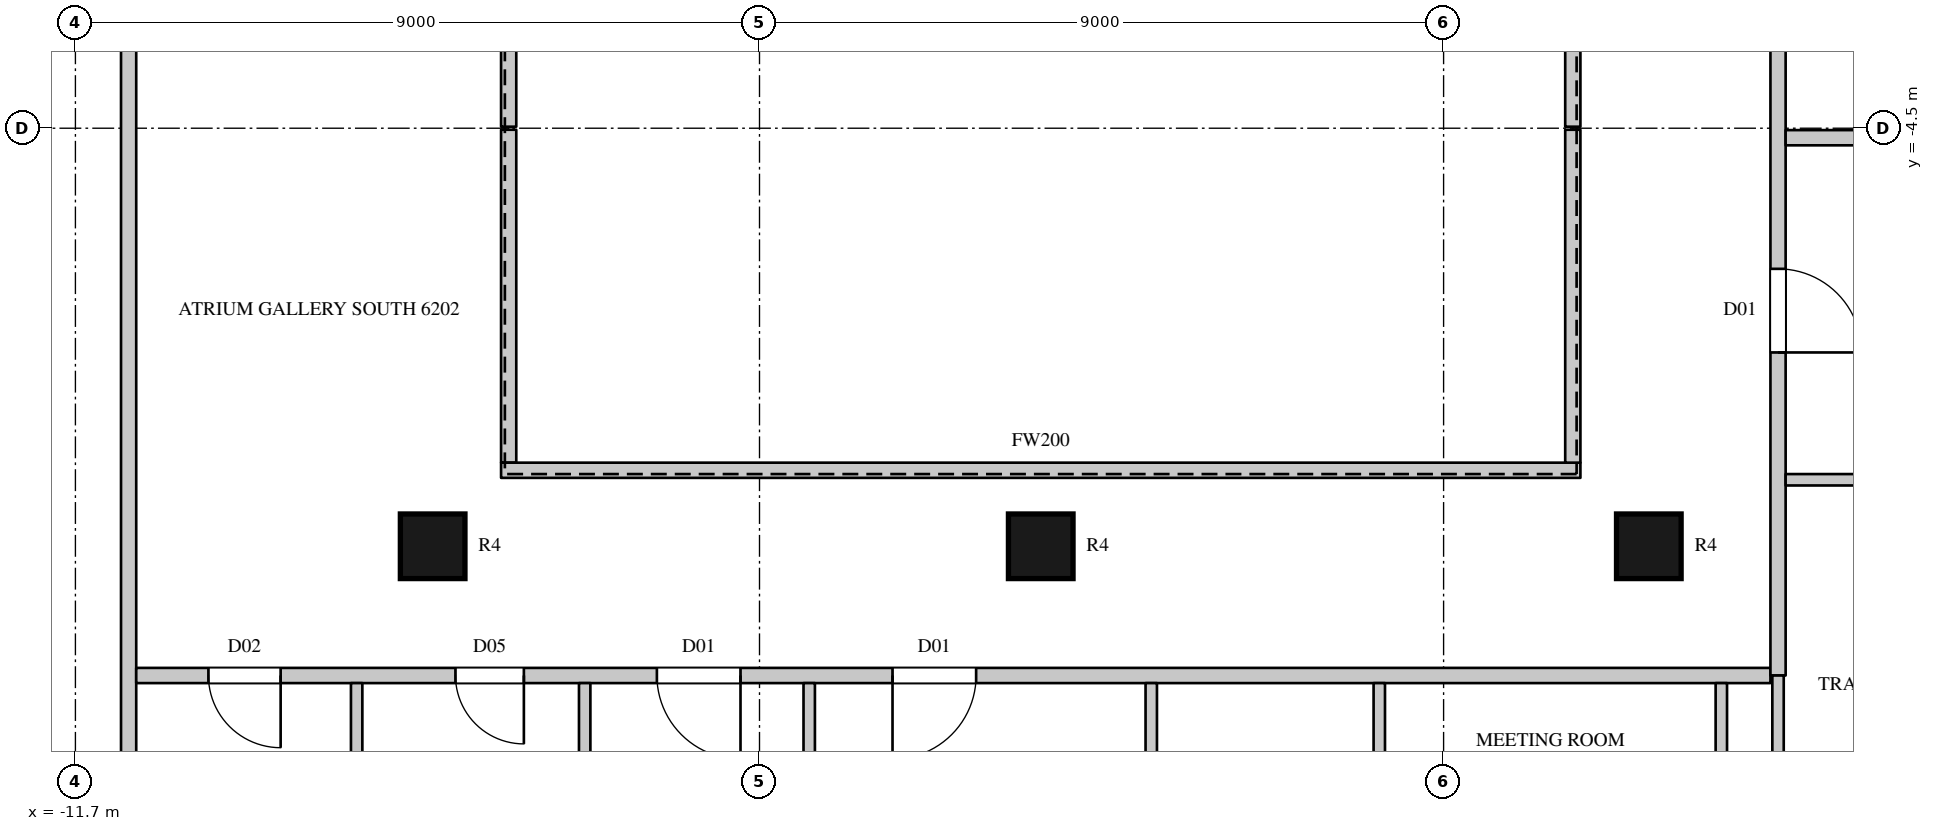
"""IFC4 building model, lengths in metres.
Left out: names, types, materials, properties, quantities, classifications, styles, units other than length and angle.
Written with IfcOpenShell. Run it as: python <this file> out.ifc"""

import sys

from ifc_helpers import new_model, si_unit, direction, frame, frame_2d, origin, origin_2d, place, context, subcontext, project, spatial, rectangle, circle, extrude, element, fill, save


model = new_model("IFC4")
c1 = context("Model", 3, precision=1e-05, world=origin(), true_north=direction((0.0, 1.0)))
c2 = subcontext(c1, "Body", "Model", "MODEL_VIEW")
j1 = project(units=[si_unit("LENGTHUNIT", "METRE"), si_unit("PLANEANGLEUNIT", "RADIAN")], contexts=[c1])
p1 = place(None, origin())
s1 = spatial("IfcSite", under=j1, at=p1, CompositionType="ELEMENT")
p2 = place(p1, origin())
s2 = spatial("IfcBuilding", under=s1, at=p2, CompositionType="ELEMENT")
p3 = place(p2, frame((0.0, 0.0, 276.2)))
s3 = spatial("IfcBuildingStorey", under=s2, at=p3, CompositionType="ELEMENT", Elevation=276.2)
for number, where, z_axis, x_axis in (
    (1, (-7.0, -10.0, 0.0), (0.0, 0.0, 1.0), (1.0, 0.0, 0.0)),
    (2, (1.0, -10.0, 0.0), (0.0, 0.0, 1.0), (1.0, 0.0, 0.0)),
    (3, (9.0, -10.0, 0.0), (0.0, 0.0, 1.0), (1.0, 0.0, 0.0)),
):
    element("IfcColumn", number, at=place(p3, frame(where, z_axis=z_axis, x_axis=x_axis)), inside=s3, PredefinedType="COLUMN", context=c2, shape_type="SweptSolid", body=[
        extrude(circle(Radius=0.425, at=origin_2d()), origin(), (0.0, 0.0, 1.0), 4.1),
    ])
p4 = place(p3, frame((-11.0, -14.8, 0.0), z_axis=(0.0, 0.0, 1.0), x_axis=(0.0, 1.0, 0.0)))
e4 = element("IfcWall", 4, at=p4, inside=s3, PredefinedType="PARTITIONING", context=c2, shape_type="SweptSolid", body=[
    extrude(rectangle(XDim=29.5, YDim=0.2, at=frame_2d((14.75, 0.0))), origin(), (0.0, 0.0, 1.0), 3.8),
])
p5 = place(p4, frame((17.9, 0.0, 0.0)))
e5 = element("IfcOpeningElement", 5, at=p5, cuts=e4, PredefinedType="OPENING", context=c2, shape_type="SweptSolid", body=[
    extrude(rectangle(XDim=1.5, YDim=2.4, at=frame_2d((0.75, 1.2))), frame((0.0, 0.11, 0.0), z_axis=(0.0, -1.0, 0.0), x_axis=(1.0, 0.0, 0.0)), (0.0, 0.0, 1.0), 0.22),
])
p6 = place(p3, frame((-10.9, -11.7, 0.0), z_axis=(0.0, 0.0, 1.0), x_axis=(1.0, 0.0, 0.0)))
e6 = element("IfcWall", 6, at=p6, inside=s3, PredefinedType="PARTITIONING", context=c2, shape_type="SweptSolid", body=[
    extrude(rectangle(XDim=21.5, YDim=0.2, at=frame_2d((10.75, 0.0))), origin(), (0.0, 0.0, 1.0), 3.8),
])
p7 = place(p6, frame((0.95, 0.0, 0.0)))
e7 = element("IfcOpeningElement", 7, at=p7, cuts=e6, PredefinedType="OPENING", context=c2, shape_type="SweptSolid", body=[
    extrude(rectangle(XDim=0.95, YDim=2.2, at=frame_2d((0.475, 1.1))), frame((0.0, 0.11, 0.0), z_axis=(0.0, -1.0, 0.0), x_axis=(1.0, 0.0, 0.0)), (0.0, 0.0, 1.0), 0.22),
])
p8 = place(p6, frame((4.2, 0.0, 0.0)))
e8 = element("IfcOpeningElement", 8, at=p8, cuts=e6, PredefinedType="OPENING", context=c2, shape_type="SweptSolid", body=[
    extrude(rectangle(XDim=0.9, YDim=2.2, at=frame_2d((0.45, 1.1))), frame((0.0, 0.11, 0.0), z_axis=(0.0, -1.0, 0.0), x_axis=(1.0, 0.0, 0.0)), (0.0, 0.0, 1.0), 0.22),
])
p9 = place(p6, frame((6.85, 0.0, 0.0)))
e9 = element("IfcOpeningElement", 9, at=p9, cuts=e6, PredefinedType="OPENING", context=c2, shape_type="SweptSolid", body=[
    extrude(rectangle(XDim=1.1, YDim=2.4, at=frame_2d((0.55, 1.2))), frame((0.0, 0.11, 0.0), z_axis=(0.0, -1.0, 0.0), x_axis=(1.0, 0.0, 0.0)), (0.0, 0.0, 1.0), 0.22),
])
p10 = place(p6, frame((9.95, 0.0, 0.0)))
e10 = element("IfcOpeningElement", 10, at=p10, cuts=e6, PredefinedType="OPENING", context=c2, shape_type="SweptSolid", body=[
    extrude(rectangle(XDim=1.1, YDim=2.4, at=frame_2d((0.55, 1.2))), frame((0.0, 0.11, 0.0), z_axis=(0.0, -1.0, 0.0), x_axis=(1.0, 0.0, 0.0)), (0.0, 0.0, 1.0), 0.22),
])
p11 = place(p3, frame((-6.0, -8.9, 0.0), z_axis=(0.0, 0.0, 1.0), x_axis=(0.0, 1.0, 0.0)))
e11 = element("IfcWall", 11, at=p11, inside=s3, PredefinedType="PARTITIONING", context=c2, shape_type="SweptSolid", body=[
    extrude(rectangle(XDim=4.38, YDim=0.2, at=frame_2d((2.19, 0.0))), origin(), (0.0, 0.0, 1.0), 3.8),
])
p12 = place(p3, frame((-6.1, -9.0, 0.0), z_axis=(0.0, 0.0, 1.0), x_axis=(1.0, 0.0, 0.0)))
e12 = element("IfcWall", 12, at=p12, inside=s3, PredefinedType="PARTITIONING", context=c2, shape_type="SweptSolid", body=[
    extrude(rectangle(XDim=14.2, YDim=0.2, at=frame_2d((7.1, 0.0))), origin(), (0.0, 0.0, 1.0), 3.8),
])
p13 = place(p3, frame((-6.0, -4.48, 0.0), z_axis=(0.0, 0.0, 1.0), x_axis=(0.0, 1.0, 0.0)))
e13 = element("IfcWall", 13, at=p13, inside=s3, PredefinedType="PARTITIONING", context=c2, shape_type="SweptSolid", body=[
    extrude(rectangle(XDim=13.38, YDim=0.2, at=frame_2d((6.69, 0.0))), origin(), (0.0, 0.0, 1.0), 3.8),
])
p14 = place(p3, frame((8.0, -8.9, 0.0), z_axis=(0.0, 0.0, 1.0), x_axis=(0.0, 1.0, 0.0)))
e14 = element("IfcWall", 14, at=p14, inside=s3, PredefinedType="PARTITIONING", context=c2, shape_type="SweptSolid", body=[
    extrude(rectangle(XDim=4.38, YDim=0.2, at=frame_2d((2.19, 0.0))), origin(), (0.0, 0.0, 1.0), 3.8),
])
p15 = place(p3, frame((8.0, -4.48, 0.0), z_axis=(0.0, 0.0, 1.0), x_axis=(0.0, 1.0, 0.0)))
e15 = element("IfcWall", 15, at=p15, inside=s3, PredefinedType="PARTITIONING", context=c2, shape_type="SweptSolid", body=[
    extrude(rectangle(XDim=13.38, YDim=0.2, at=frame_2d((6.69, 0.0))), origin(), (0.0, 0.0, 1.0), 3.8),
])
p16 = place(p3, frame((10.7, -11.7, 0.0), z_axis=(0.0, 0.0, 1.0), x_axis=(0.0, 1.0, 0.0)))
e16 = element("IfcWall", 16, at=p16, inside=s3, PredefinedType="PARTITIONING", context=c2, shape_type="SweptSolid", body=[
    extrude(rectangle(XDim=23.8, YDim=0.2, at=frame_2d((11.9, 0.0))), origin(), (0.0, 0.0, 1.0), 3.8),
])
p17 = place(p16, frame((12.35, 0.0, 0.0)))
e17 = element("IfcOpeningElement", 17, at=p17, cuts=e16, PredefinedType="OPENING", context=c2, shape_type="SweptSolid", body=[
    extrude(rectangle(XDim=1.5, YDim=2.4, at=frame_2d((0.75, 1.2))), frame((0.0, 0.11, 0.0), z_axis=(0.0, -1.0, 0.0), x_axis=(1.0, 0.0, 0.0)), (0.0, 0.0, 1.0), 0.22),
])
p18 = place(p16, frame((19.55, 0.0, 0.0)))
e18 = element("IfcOpeningElement", 18, at=p18, cuts=e16, PredefinedType="OPENING", context=c2, shape_type="SweptSolid", body=[
    extrude(rectangle(XDim=1.1, YDim=2.4, at=frame_2d((0.55, 1.2))), frame((0.0, 0.11, 0.0), z_axis=(0.0, -1.0, 0.0), x_axis=(1.0, 0.0, 0.0)), (0.0, 0.0, 1.0), 0.22),
])
p19 = place(p16, frame((4.25, 0.0, 0.0)))
e19 = element("IfcOpeningElement", 19, at=p19, cuts=e16, PredefinedType="OPENING", context=c2, shape_type="SweptSolid", body=[
    extrude(rectangle(XDim=1.1, YDim=2.4, at=frame_2d((0.55, 1.2))), frame((0.0, 0.11, 0.0), z_axis=(0.0, -1.0, 0.0), x_axis=(1.0, 0.0, 0.0)), (0.0, 0.0, 1.0), 0.22),
])
p20 = place(p3, frame((10.8, -4.625, 0.0), z_axis=(0.0, 0.0, 1.0), x_axis=(1.0, 0.0, 0.0)))
e20 = element("IfcWall", 20, at=p20, inside=s3, PredefinedType="PARTITIONING", context=c2, shape_type="SweptSolid", body=[
    extrude(rectangle(XDim=3.875, YDim=0.2, at=frame_2d((1.938, 0.0))), origin(), (0.0, 0.0, 1.0), 3.8),
])
for number, where, z_axis, x_axis in (
    (21, (-8.0, -24.04, 0.0), (0.0, 0.0, 1.0), (0.0, 1.0, 0.0)),
    (22, (-5.0, -24.04, 0.0), (0.0, 0.0, 1.0), (0.0, 1.0, 0.0)),
):
    element("IfcWall", number, at=place(p3, frame(where, z_axis=z_axis, x_axis=x_axis)), inside=s3, PredefinedType="PARTITIONING", context=c2, shape_type="SweptSolid", body=[
        extrude(rectangle(XDim=12.24, YDim=0.15, at=frame_2d((6.12, 0.0))), origin(), (0.0, 0.0, 1.0), 3.8),
    ])
p21 = place(p3, frame((-2.046, -23.441, 0.0), z_axis=(0.0, 0.0, 1.0), x_axis=(0.0, 1.0, 0.0)))
e23 = element("IfcWall", 23, at=p21, inside=s3, PredefinedType="PARTITIONING", context=c2, shape_type="SweptSolid", body=[
    extrude(rectangle(XDim=11.641, YDim=0.15, at=frame_2d((5.821, 0.0))), origin(), (0.0, 0.0, 1.0), 3.8),
])
p22 = place(p3, frame((2.454, -15.525, 0.0), z_axis=(0.0, 0.0, 1.0), x_axis=(0.0, 1.0, 0.0)))
e24 = element("IfcWall", 24, at=p22, inside=s3, PredefinedType="PARTITIONING", context=c2, shape_type="SweptSolid", body=[
    extrude(rectangle(XDim=3.725, YDim=0.15, at=frame_2d((1.862, 0.0))), origin(), (0.0, 0.0, 1.0), 3.8),
])
p23 = place(p22, frame((1.4, 0.0, 0.0)))
e25 = element("IfcOpeningElement", 25, at=p23, cuts=e24, PredefinedType="OPENING", context=c2, shape_type="SweptSolid", body=[
    extrude(rectangle(XDim=0.95, YDim=2.2, at=frame_2d((0.475, 1.1))), frame((0.0, 0.085, 0.0), z_axis=(0.0, -1.0, 0.0), x_axis=(1.0, 0.0, 0.0)), (0.0, 0.0, 1.0), 0.17),
])
for number, where, z_axis, x_axis in (
    (26, (5.454, -15.525, 0.0), (0.0, 0.0, 1.0), (0.0, 1.0, 0.0)),
    (27, (9.954, -15.525, 0.0), (0.0, 0.0, 1.0), (0.0, 1.0, 0.0)),
):
    element("IfcWall", number, at=place(p3, frame(where, z_axis=z_axis, x_axis=x_axis)), inside=s3, PredefinedType="PARTITIONING", context=c2, shape_type="SweptSolid", body=[
        extrude(rectangle(XDim=3.725, YDim=0.15, at=frame_2d((1.862, 0.0))), origin(), (0.0, 0.0, 1.0), 3.8),
    ])
p24 = place(p3, frame((10.7, -20.828, 0.0), z_axis=(0.0, 0.0, 1.0), x_axis=(0.0, 1.0, 0.0)))
e28 = element("IfcWall", 28, at=p24, inside=s3, PredefinedType="PARTITIONING", context=c2, shape_type="SweptSolid", body=[
    extrude(rectangle(XDim=9.128, YDim=0.15, at=frame_2d((4.564, 0.0))), origin(), (0.0, 0.0, 1.0), 3.8),
])
p25 = place(p3, frame((10.8, -9.125, 0.0), z_axis=(0.0, 0.0, 1.0), x_axis=(1.0, 0.0, 0.0)))
e29 = element("IfcWall", 29, at=p25, inside=s3, PredefinedType="PARTITIONING", context=c2, shape_type="SweptSolid", body=[
    extrude(rectangle(XDim=3.875, YDim=0.15, at=frame_2d((1.938, 0.0))), origin(), (0.0, 0.0, 1.0), 3.8),
])
p26 = place(p25, frame((2.65, 0.0, 0.0)))
e30 = element("IfcOpeningElement", 30, at=p26, cuts=e29, PredefinedType="OPENING", context=c2, shape_type="SweptSolid", body=[
    extrude(rectangle(XDim=0.95, YDim=2.2, at=frame_2d((0.475, 1.1))), frame((0.0, 0.085, 0.0), z_axis=(0.0, -1.0, 0.0), x_axis=(1.0, 0.0, 0.0)), (0.0, 0.0, 1.0), 0.17),
])
p27 = place(p7, origin())
e31 = element("IfcDoor", 31, at=p27, inside=s3, OperationType="SINGLE_SWING_LEFT", PredefinedType="DOOR", context=c2, shape_type="SweptSolid", body=[
    extrude(rectangle(XDim=0.95, YDim=2.2, at=frame_2d((0.475, 1.1))), frame((0.0, 0.025, 0.0), z_axis=(0.0, -1.0, 0.0), x_axis=(1.0, 0.0, 0.0)), (0.0, 0.0, 1.0), 0.05),
])
fill(e7, e31)
p28 = place(p8, origin())
e32 = element("IfcDoor", 32, at=p28, inside=s3, OperationType="SINGLE_SWING_LEFT", PredefinedType="DOOR", context=c2, shape_type="SweptSolid", body=[
    extrude(rectangle(XDim=0.9, YDim=2.2, at=frame_2d((0.45, 1.1))), frame((0.0, 0.025, 0.0), z_axis=(0.0, -1.0, 0.0), x_axis=(1.0, 0.0, 0.0)), (0.0, 0.0, 1.0), 0.05),
])
fill(e8, e32)
p29 = place(p9, origin())
e33 = element("IfcDoor", 33, at=p29, inside=s3, OperationType="SINGLE_SWING_LEFT", PredefinedType="DOOR", context=c2, shape_type="SweptSolid", body=[
    extrude(rectangle(XDim=1.1, YDim=2.4, at=frame_2d((0.55, 1.2))), frame((0.0, 0.025, 0.0), z_axis=(0.0, -1.0, 0.0), x_axis=(1.0, 0.0, 0.0)), (0.0, 0.0, 1.0), 0.05),
])
fill(e9, e33)
p30 = place(p10, origin())
e34 = element("IfcDoor", 34, at=p30, inside=s3, OperationType="SINGLE_SWING_RIGHT", PredefinedType="DOOR", context=c2, shape_type="SweptSolid", body=[
    extrude(rectangle(XDim=1.1, YDim=2.4, at=frame_2d((0.55, 1.2))), frame((0.0, 0.025, 0.0), z_axis=(0.0, -1.0, 0.0), x_axis=(1.0, 0.0, 0.0)), (0.0, 0.0, 1.0), 0.05),
])
fill(e10, e34)
p31 = place(p19, origin())
e35 = element("IfcDoor", 35, at=p31, inside=s3, OperationType="SINGLE_SWING_RIGHT", PredefinedType="DOOR", context=c2, shape_type="SweptSolid", body=[
    extrude(rectangle(XDim=1.1, YDim=2.4, at=frame_2d((0.55, 1.2))), frame((0.0, 0.025, 0.0), z_axis=(0.0, -1.0, 0.0), x_axis=(1.0, 0.0, 0.0)), (0.0, 0.0, 1.0), 0.05),
])
fill(e19, e35)
save(model, sys.argv[1])
